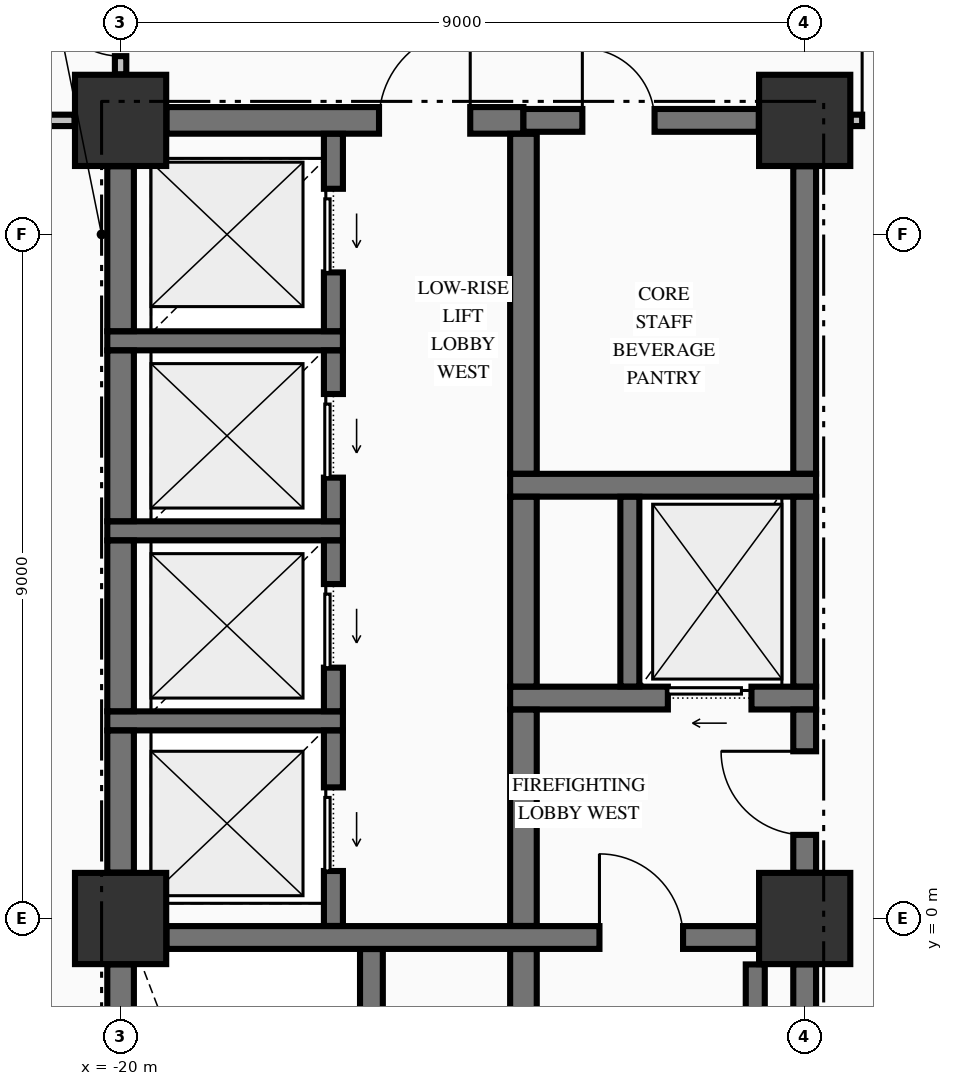
"""IFC4 building model, lengths in metres.
Left out: names, types, materials, properties, quantities, classifications, styles, units other than length and angle.
Written with IfcOpenShell. Run it as: python <this file> out.ifc"""

import sys

from ifc_helpers import new_model, si_unit, direction, frame, frame_2d, origin, origin_2d, place, context, subcontext, project, spatial, rectangle, extrude, element, fill, save


model = new_model("IFC4")
c1 = context("Model", 3, precision=1e-05, world=origin(), true_north=direction((0.0, 1.0)))
c2 = subcontext(c1, "Body", "Model", "MODEL_VIEW")
j1 = project(units=[si_unit("LENGTHUNIT", "METRE"), si_unit("PLANEANGLEUNIT", "RADIAN")], contexts=[c1])
p1 = place(None, origin())
s1 = spatial("IfcSite", under=j1, at=p1, CompositionType="ELEMENT")
p2 = place(p1, origin())
s2 = spatial("IfcBuilding", under=s1, at=p2, CompositionType="ELEMENT")
p3 = place(p2, frame((0.0, 0.0, 45.05)))
s3 = spatial("IfcBuildingStorey", under=s2, at=p3, CompositionType="ELEMENT", Elevation=45.05)
for number, where, z_axis, x_axis in (
    (1, (-20.0, 10.5, -0.25), (0.0, 0.0, 1.0), (1.0, 0.0, 0.0)),
    (2, (-11.0, 0.0, -0.25), (0.0, 0.0, 1.0), (1.0, 0.0, 0.0)),
    (3, (-11.0, 10.5, -0.25), (0.0, 0.0, 1.0), (1.0, 0.0, 0.0)),
    (4, (-20.0, 0.0, -0.25), (0.0, 0.0, 1.0), (1.0, 0.0, 0.0)),
):
    element("IfcColumn", number, at=place(p3, frame(where, z_axis=z_axis, x_axis=x_axis)), inside=s3, PredefinedType="COLUMN", context=c2, shape_type="SweptSolid", body=[
        extrude(rectangle(XDim=1.2, YDim=1.2, at=origin_2d()), origin(), (0.0, 0.0, 1.0), 3.57),
    ])
p4 = place(p3, frame((-19.396, -0.25, 0.0), z_axis=(0.0, 0.0, 1.0), x_axis=(1.0, 0.0, 0.0)))
e5 = element("IfcWall", 5, at=p4, inside=s3, PredefinedType="SHEAR", context=c2, shape_type="SweptSolid", body=[
    extrude(rectangle(XDim=7.792, YDim=0.3, at=frame_2d((3.896, 0.0))), origin(), (0.0, 0.0, 1.0), 3.32),
])
p5 = place(p4, frame((5.696, 0.0, 0.0)))
e6 = element("IfcOpeningElement", 6, at=p5, cuts=e5, PredefinedType="OPENING", context=c2, shape_type="SweptSolid", body=[
    extrude(rectangle(XDim=1.1, YDim=2.15, at=frame_2d((0.55, 1.075))), frame((0.0, 0.16, 0.0), z_axis=(0.0, -1.0, 0.0), x_axis=(1.0, 0.0, 0.0)), (0.0, 0.0, 1.0), 0.32),
])
p6 = place(p3, frame((-20.175, 2.6, 0.0), z_axis=(0.0, 0.0, 1.0), x_axis=(1.0, 0.0, 0.0)))
e7 = element("IfcWall", 7, at=p6, inside=s3, PredefinedType="SOLIDWALL", context=c2, shape_type="SweptSolid", body=[
    extrude(rectangle(XDim=3.1, YDim=0.25, at=frame_2d((1.55, 0.0))), origin(), (0.0, 0.0, 1.0), 3.32),
])
p7 = place(p3, frame((-14.875, 2.9, 0.0), z_axis=(0.0, 0.0, 1.0), x_axis=(1.0, 0.0, 0.0)))
e8 = element("IfcWall", 8, at=p7, inside=s3, PredefinedType="SHEAR", context=c2, shape_type="SweptSolid", body=[
    extrude(rectangle(XDim=4.025, YDim=0.3, at=frame_2d((2.012, 0.0))), origin(), (0.0, 0.0, 1.0), 3.32),
])
p8 = place(p7, frame((2.075, 0.0, 0.0)))
e9 = element("IfcOpeningElement", 9, at=p8, cuts=e8, PredefinedType="OPENING", context=c2, shape_type="SweptSolid", body=[
    extrude(rectangle(XDim=1.1, YDim=2.2, at=frame_2d((0.55, 1.1))), frame((0.0, 0.16, 0.0), z_axis=(0.0, -1.0, 0.0), x_axis=(1.0, 0.0, 0.0)), (0.0, 0.0, 1.0), 0.32),
])
p9 = place(p3, frame((-20.175, 5.1, 0.0), z_axis=(0.0, 0.0, 1.0), x_axis=(1.0, 0.0, 0.0)))
e10 = element("IfcWall", 10, at=p9, inside=s3, PredefinedType="SOLIDWALL", context=c2, shape_type="SweptSolid", body=[
    extrude(rectangle(XDim=3.1, YDim=0.25, at=frame_2d((1.55, 0.0))), origin(), (0.0, 0.0, 1.0), 3.32),
])
p10 = place(p3, frame((-14.875, 5.7, 0.0), z_axis=(0.0, 0.0, 1.0), x_axis=(1.0, 0.0, 0.0)))
e11 = element("IfcWall", 11, at=p10, inside=s3, PredefinedType="SHEAR", context=c2, shape_type="SweptSolid", body=[
    extrude(rectangle(XDim=4.025, YDim=0.3, at=frame_2d((2.012, 0.0))), origin(), (0.0, 0.0, 1.0), 3.32),
])
p11 = place(p3, frame((-20.175, 7.6, 0.0), z_axis=(0.0, 0.0, 1.0), x_axis=(1.0, 0.0, 0.0)))
e12 = element("IfcWall", 12, at=p11, inside=s3, PredefinedType="SOLIDWALL", context=c2, shape_type="SweptSolid", body=[
    extrude(rectangle(XDim=3.1, YDim=0.25, at=frame_2d((1.55, 0.0))), origin(), (0.0, 0.0, 1.0), 3.32),
])
p12 = place(p3, frame((-19.396, 10.5, 0.0), z_axis=(0.0, 0.0, 1.0), x_axis=(1.0, 0.0, 0.0)))
e13 = element("IfcWall", 13, at=p12, inside=s3, PredefinedType="SHEAR", context=c2, shape_type="SweptSolid", body=[
    extrude(rectangle(XDim=4.696, YDim=0.35, at=frame_2d((2.348, 0.0))), origin(), (0.0, 0.0, 1.0), 3.32),
])
p13 = place(p12, frame((2.796, 0.0, 0.0)))
e14 = element("IfcOpeningElement", 14, at=p13, cuts=e13, PredefinedType="OPENING", context=c2, shape_type="SweptSolid", body=[
    extrude(rectangle(XDim=1.2, YDim=2.15, at=frame_2d((0.6, 1.075))), frame((0.0, 0.185, 0.0), z_axis=(0.0, -1.0, 0.0), x_axis=(1.0, 0.0, 0.0)), (0.0, 0.0, 1.0), 0.37),
])
p14 = place(p3, frame((-14.7, 10.5, 0.0), z_axis=(0.0, 0.0, 1.0), x_axis=(1.0, 0.0, 0.0)))
e15 = element("IfcWall", 15, at=p14, inside=s3, PredefinedType="SHEAR", context=c2, shape_type="SweptSolid", body=[
    extrude(rectangle(XDim=3.096, YDim=0.3, at=frame_2d((1.548, 0.0))), origin(), (0.0, 0.0, 1.0), 3.32),
])
p15 = place(p14, frame((0.775, 0.0, 0.0)))
e16 = element("IfcOpeningElement", 16, at=p15, cuts=e15, PredefinedType="OPENING", context=c2, shape_type="SweptSolid", body=[
    extrude(rectangle(XDim=0.95, YDim=2.15, at=frame_2d((0.475, 1.075))), frame((0.0, 0.16, 0.0), z_axis=(0.0, -1.0, 0.0), x_axis=(1.0, 0.0, 0.0)), (0.0, 0.0, 1.0), 0.32),
])
p16 = place(p3, frame((-23.835, 10.5, 0.0), z_axis=(0.0, 0.0, 1.0), x_axis=(1.0, 0.0, 0.0)))
e17 = element("IfcWall", 17, at=p16, inside=s3, PredefinedType="PARTITIONING", context=c2, shape_type="SweptSolid", body=[
    extrude(rectangle(XDim=3.229, YDim=0.15, at=frame_2d((1.615, 0.0))), origin(), (0.0, 0.0, 1.0), 3.32),
])
p17 = place(p16, frame((1.335, 0.0, 0.0)))
e18 = element("IfcOpeningElement", 18, at=p17, cuts=e17, PredefinedType="OPENING", context=c2, shape_type="SweptSolid", body=[
    extrude(rectangle(XDim=1.0, YDim=2.15, at=frame_2d((0.5, 1.075))), frame((0.0, 0.085, 0.0), z_axis=(0.0, -1.0, 0.0), x_axis=(1.0, 0.0, 0.0)), (0.0, 0.0, 1.0), 0.17),
])
p18 = place(p3, frame((-10.394, 10.5, 0.0), z_axis=(0.0, 0.0, 1.0), x_axis=(1.0, 0.0, 0.0)))
e19 = element("IfcWall", 19, at=p18, inside=s3, PredefinedType="PARTITIONING", context=c2, shape_type="SweptSolid", body=[
    extrude(rectangle(XDim=20.788, YDim=0.15, at=frame_2d((10.394, 0.0))), origin(), (0.0, 0.0, 1.0), 3.32),
])
p19 = place(p18, frame((0.15, 0.0, 0.0)))
e20 = element("IfcOpeningElement", 20, at=p19, cuts=e19, PredefinedType="OPENING", context=c2, shape_type="SweptSolid", body=[
    extrude(rectangle(XDim=1.05, YDim=2.15, at=frame_2d((0.525, 1.075))), frame((0.0, 0.085, 0.0), z_axis=(0.0, -1.0, 0.0), x_axis=(1.0, 0.0, 0.0)), (0.0, 0.0, 1.0), 0.17),
])
p20 = place(p18, frame((19.588, 0.0, 0.0)))
e21 = element("IfcOpeningElement", 21, at=p20, cuts=e19, PredefinedType="OPENING", context=c2, shape_type="SweptSolid", body=[
    extrude(rectangle(XDim=1.05, YDim=2.15, at=frame_2d((0.525, 1.075))), frame((0.0, 0.085, 0.0), z_axis=(0.0, -1.0, 0.0), x_axis=(1.0, 0.0, 0.0)), (0.0, 0.0, 1.0), 0.17),
])
p21 = place(p3, frame((-20.0, -9.346, 0.0), z_axis=(0.0, 0.0, 1.0), x_axis=(0.0, 1.0, 0.0)))
e22 = element("IfcWall", 22, at=p21, inside=s3, PredefinedType="SHEAR", context=c2, shape_type="SweptSolid", body=[
    extrude(rectangle(XDim=8.742, YDim=0.35, at=frame_2d((4.371, 0.0))), origin(), (0.0, 0.0, 1.0), 3.32),
])
p22 = place(p3, frame((-20.0, 0.604, 0.0), z_axis=(0.0, 0.0, 1.0), x_axis=(0.0, 1.0, 0.0)))
e23 = element("IfcWall", 23, at=p22, inside=s3, PredefinedType="SHEAR", context=c2, shape_type="SweptSolid", body=[
    extrude(rectangle(XDim=1.869, YDim=0.35, at=frame_2d((0.935, 0.0))), origin(), (0.0, 0.0, 1.0), 3.32),
])
for number, where, z_axis, x_axis in (
    (24, (-20.0, 2.727, 0.0), (0.0, 0.0, 1.0), (0.0, 1.0, 0.0)),
    (25, (-20.0, 5.227, 0.0), (0.0, 0.0, 1.0), (0.0, 1.0, 0.0)),
):
    element("IfcWall", number, at=place(p3, frame(where, z_axis=z_axis, x_axis=x_axis)), inside=s3, PredefinedType="SHEAR", context=c2, shape_type="SweptSolid", body=[
        extrude(rectangle(XDim=2.246, YDim=0.35, at=frame_2d((1.123, 0.0))), origin(), (0.0, 0.0, 1.0), 3.32),
    ])
p23 = place(p3, frame((-20.0, 7.727, 0.0), z_axis=(0.0, 0.0, 1.0), x_axis=(0.0, 1.0, 0.0)))
e26 = element("IfcWall", 26, at=p23, inside=s3, PredefinedType="SHEAR", context=c2, shape_type="SweptSolid", body=[
    extrude(rectangle(XDim=2.169, YDim=0.35, at=frame_2d((1.084, 0.0))), origin(), (0.0, 0.0, 1.0), 3.32),
])
p24 = place(p3, frame((-17.2, -0.098, 0.0), z_axis=(0.0, 0.0, 1.0), x_axis=(0.0, 1.0, 0.0)))
e27 = element("IfcWall", 27, at=p24, inside=s3, PredefinedType="SOLIDWALL", context=c2, shape_type="SweptSolid", body=[
    extrude(rectangle(XDim=2.571, YDim=0.25, at=frame_2d((1.285, 0.0))), origin(), (0.0, 0.0, 1.0), 3.32),
])
p25 = place(p24, frame((0.723, 0.0, 0.0)))
e28 = element("IfcOpeningElement", 28, at=p25, cuts=e27, PredefinedType="OPENING", context=c2, shape_type="SweptSolid", body=[
    extrude(rectangle(XDim=1.1, YDim=2.2, at=frame_2d((0.55, 1.1))), frame((0.0, 0.135, 0.0), z_axis=(0.0, -1.0, 0.0), x_axis=(1.0, 0.0, 0.0)), (0.0, 0.0, 1.0), 0.27),
])
p26 = place(p3, frame((-17.2, 2.727, 0.0), z_axis=(0.0, 0.0, 1.0), x_axis=(0.0, 1.0, 0.0)))
e29 = element("IfcWall", 29, at=p26, inside=s3, PredefinedType="SOLIDWALL", context=c2, shape_type="SweptSolid", body=[
    extrude(rectangle(XDim=2.246, YDim=0.25, at=frame_2d((1.123, 0.0))), origin(), (0.0, 0.0, 1.0), 3.32),
])
p27 = place(p26, frame((0.573, 0.0, 0.0)))
e30 = element("IfcOpeningElement", 30, at=p27, cuts=e29, PredefinedType="OPENING", context=c2, shape_type="SweptSolid", body=[
    extrude(rectangle(XDim=1.1, YDim=2.2, at=frame_2d((0.55, 1.1))), frame((0.0, 0.135, 0.0), z_axis=(0.0, -1.0, 0.0), x_axis=(1.0, 0.0, 0.0)), (0.0, 0.0, 1.0), 0.27),
])
p28 = place(p3, frame((-17.2, 5.227, 0.0), z_axis=(0.0, 0.0, 1.0), x_axis=(0.0, 1.0, 0.0)))
e31 = element("IfcWall", 31, at=p28, inside=s3, PredefinedType="SOLIDWALL", context=c2, shape_type="SweptSolid", body=[
    extrude(rectangle(XDim=2.246, YDim=0.25, at=frame_2d((1.123, 0.0))), origin(), (0.0, 0.0, 1.0), 3.32),
])
p29 = place(p28, frame((0.573, 0.0, 0.0)))
e32 = element("IfcOpeningElement", 32, at=p29, cuts=e31, PredefinedType="OPENING", context=c2, shape_type="SweptSolid", body=[
    extrude(rectangle(XDim=1.1, YDim=2.2, at=frame_2d((0.55, 1.1))), frame((0.0, 0.135, 0.0), z_axis=(0.0, -1.0, 0.0), x_axis=(1.0, 0.0, 0.0)), (0.0, 0.0, 1.0), 0.27),
])
p30 = place(p3, frame((-17.2, 7.727, 0.0), z_axis=(0.0, 0.0, 1.0), x_axis=(0.0, 1.0, 0.0)))
e33 = element("IfcWall", 33, at=p30, inside=s3, PredefinedType="SOLIDWALL", context=c2, shape_type="SweptSolid", body=[
    extrude(rectangle(XDim=2.596, YDim=0.25, at=frame_2d((1.298, 0.0))), origin(), (0.0, 0.0, 1.0), 3.32),
])
p31 = place(p30, frame((0.773, 0.0, 0.0)))
e34 = element("IfcOpeningElement", 34, at=p31, cuts=e33, PredefinedType="OPENING", context=c2, shape_type="SweptSolid", body=[
    extrude(rectangle(XDim=1.1, YDim=2.2, at=frame_2d((0.55, 1.1))), frame((0.0, 0.135, 0.0), z_axis=(0.0, -1.0, 0.0), x_axis=(1.0, 0.0, 0.0)), (0.0, 0.0, 1.0), 0.27),
])
p32 = place(p3, frame((-16.7, -9.773, 0.0), z_axis=(0.0, 0.0, 1.0), x_axis=(0.0, 1.0, 0.0)))
e35 = element("IfcWall", 35, at=p32, inside=s3, PredefinedType="SHEAR", context=c2, shape_type="SweptSolid", body=[
    extrude(rectangle(XDim=9.371, YDim=0.3, at=frame_2d((4.686, 0.0))), origin(), (0.0, 0.0, 1.0), 3.32),
])
p33 = place(p3, frame((-14.7, -9.773, 0.0), z_axis=(0.0, 0.0, 1.0), x_axis=(0.0, 1.0, 0.0)))
e36 = element("IfcWall", 36, at=p33, inside=s3, PredefinedType="SHEAR", context=c2, shape_type="SweptSolid", body=[
    extrude(rectangle(XDim=9.371, YDim=0.35, at=frame_2d((4.686, 0.0))), origin(), (0.0, 0.0, 1.0), 3.32),
])
p34 = place(p3, frame((-14.7, -0.098, 0.0), z_axis=(0.0, 0.0, 1.0), x_axis=(0.0, 1.0, 0.0)))
e37 = element("IfcWall", 37, at=p34, inside=s3, PredefinedType="SHEAR", context=c2, shape_type="SweptSolid", body=[
    extrude(rectangle(XDim=2.846, YDim=0.35, at=frame_2d((1.423, 0.0))), origin(), (0.0, 0.0, 1.0), 3.32),
])
p35 = place(p3, frame((-14.7, 3.052, 0.0), z_axis=(0.0, 0.0, 1.0), x_axis=(0.0, 1.0, 0.0)))
e38 = element("IfcWall", 38, at=p35, inside=s3, PredefinedType="SHEAR", context=c2, shape_type="SweptSolid", body=[
    extrude(rectangle(XDim=2.496, YDim=0.35, at=frame_2d((1.248, 0.0))), origin(), (0.0, 0.0, 1.0), 3.32),
])
p36 = place(p3, frame((-14.7, 5.852, 0.0), z_axis=(0.0, 0.0, 1.0), x_axis=(0.0, 1.0, 0.0)))
e39 = element("IfcWall", 39, at=p36, inside=s3, PredefinedType="SHEAR", context=c2, shape_type="SweptSolid", body=[
    extrude(rectangle(XDim=4.471, YDim=0.35, at=frame_2d((2.235, 0.0))), origin(), (0.0, 0.0, 1.0), 3.32),
])
p37 = place(p3, frame((-13.3, 3.052, 0.0), z_axis=(0.0, 0.0, 1.0), x_axis=(0.0, 1.0, 0.0)))
e40 = element("IfcWall", 40, at=p37, inside=s3, PredefinedType="SOLIDWALL", context=c2, shape_type="SweptSolid", body=[
    extrude(rectangle(XDim=2.496, YDim=0.25, at=frame_2d((1.248, 0.0))), origin(), (0.0, 0.0, 1.0), 3.32),
])
p38 = place(p3, frame((-11.65, -9.346, 0.0), z_axis=(0.0, 0.0, 1.0), x_axis=(0.0, 1.0, 0.0)))
e41 = element("IfcWall", 41, at=p38, inside=s3, PredefinedType="SOLIDWALL", context=c2, shape_type="SweptSolid", body=[
    extrude(rectangle(XDim=8.742, YDim=0.25, at=frame_2d((4.371, 0.0))), origin(), (0.0, 0.0, 1.0), 3.32),
])
p39 = place(p3, frame((-11.0, -9.346, 0.0), z_axis=(0.0, 0.0, 1.0), x_axis=(0.0, 1.0, 0.0)))
e42 = element("IfcWall", 42, at=p39, inside=s3, PredefinedType="SHEAR", context=c2, shape_type="SweptSolid", body=[
    extrude(rectangle(XDim=8.742, YDim=0.3, at=frame_2d((4.371, 0.0))), origin(), (0.0, 0.0, 1.0), 3.32),
])
p40 = place(p3, frame((-11.0, 0.604, 0.0), z_axis=(0.0, 0.0, 1.0), x_axis=(0.0, 1.0, 0.0)))
e43 = element("IfcWall", 43, at=p40, inside=s3, PredefinedType="SHEAR", context=c2, shape_type="SweptSolid", body=[
    extrude(rectangle(XDim=2.144, YDim=0.3, at=frame_2d((1.072, 0.0))), origin(), (0.0, 0.0, 1.0), 3.32),
])
p41 = place(p40, frame((0.496, 0.0, 0.0)))
e44 = element("IfcOpeningElement", 44, at=p41, cuts=e43, PredefinedType="OPENING", context=c2, shape_type="SweptSolid", body=[
    extrude(rectangle(XDim=1.1, YDim=2.15, at=frame_2d((0.55, 1.075))), frame((0.0, 0.16, 0.0), z_axis=(0.0, -1.0, 0.0), x_axis=(1.0, 0.0, 0.0)), (0.0, 0.0, 1.0), 0.32),
])
p42 = place(p3, frame((-11.0, 3.052, 0.0), z_axis=(0.0, 0.0, 1.0), x_axis=(0.0, 1.0, 0.0)))
e45 = element("IfcWall", 45, at=p42, inside=s3, PredefinedType="SHEAR", context=c2, shape_type="SweptSolid", body=[
    extrude(rectangle(XDim=2.496, YDim=0.3, at=frame_2d((1.248, 0.0))), origin(), (0.0, 0.0, 1.0), 3.32),
])
p43 = place(p3, frame((-11.0, 5.852, 0.0), z_axis=(0.0, 0.0, 1.0), x_axis=(0.0, 1.0, 0.0)))
e46 = element("IfcWall", 46, at=p43, inside=s3, PredefinedType="SHEAR", context=c2, shape_type="SweptSolid", body=[
    extrude(rectangle(XDim=4.044, YDim=0.3, at=frame_2d((2.022, 0.0))), origin(), (0.0, 0.0, 1.0), 3.32),
])
p44 = place(p3, frame((-20.0, 11.106, 0.0), z_axis=(0.0, 0.0, 1.0), x_axis=(0.0, 1.0, 0.0)))
e47 = element("IfcWall", 47, at=p44, inside=s3, PredefinedType="PARTITIONING", context=c2, shape_type="SweptSolid", body=[
    extrude(rectangle(XDim=1.966, YDim=0.15, at=frame_2d((0.983, 0.0))), origin(), (0.0, 0.0, 1.0), 3.32),
])
p45 = place(p44, frame((0.239, 0.0, 0.0)))
e48 = element("IfcOpeningElement", 48, at=p45, cuts=e47, PredefinedType="OPENING", context=c2, shape_type="SweptSolid", body=[
    extrude(rectangle(XDim=0.95, YDim=2.15, at=frame_2d((0.475, 1.075))), frame((0.0, 0.085, 0.0), z_axis=(0.0, -1.0, 0.0), x_axis=(1.0, 0.0, 0.0)), (0.0, 0.0, 1.0), 0.17),
])
p46 = place(p5, origin())
e49 = element("IfcDoor", 49, at=p46, inside=s3, OperationType="SINGLE_SWING_LEFT", PredefinedType="DOOR", context=c2, shape_type="SweptSolid", body=[
    extrude(rectangle(XDim=1.1, YDim=2.15, at=frame_2d((0.55, 1.075))), frame((0.0, 0.025, 0.0), z_axis=(0.0, -1.0, 0.0), x_axis=(1.0, 0.0, 0.0)), (0.0, 0.0, 1.0), 0.05),
])
fill(e6, e49)
p47 = place(p41, origin())
e50 = element("IfcDoor", 50, at=p47, inside=s3, OperationType="SINGLE_SWING_RIGHT", PredefinedType="DOOR", context=c2, shape_type="SweptSolid", body=[
    extrude(rectangle(XDim=1.1, YDim=2.15, at=frame_2d((0.55, 1.075))), frame((0.0, 0.025, 0.0), z_axis=(0.0, -1.0, 0.0), x_axis=(1.0, 0.0, 0.0)), (0.0, 0.0, 1.0), 0.05),
])
fill(e44, e50)
p48 = place(p8, origin())
e51 = element("IfcDoor", 51, at=p48, inside=s3, OperationType="SLIDING_TO_LEFT", PredefinedType="DOOR", context=c2, shape_type="SweptSolid", body=[
    extrude(rectangle(XDim=1.1, YDim=2.2, at=frame_2d((0.55, 1.1))), frame((0.0, 0.025, 0.0), z_axis=(0.0, -1.0, 0.0), x_axis=(1.0, 0.0, 0.0)), (0.0, 0.0, 1.0), 0.05),
])
fill(e9, e51)
p49 = place(p15, origin())
e52 = element("IfcDoor", 52, at=p49, inside=s3, OperationType="SINGLE_SWING_LEFT", PredefinedType="DOOR", context=c2, shape_type="SweptSolid", body=[
    extrude(rectangle(XDim=0.95, YDim=2.15, at=frame_2d((0.475, 1.075))), frame((0.0, 0.025, 0.0), z_axis=(0.0, -1.0, 0.0), x_axis=(1.0, 0.0, 0.0)), (0.0, 0.0, 1.0), 0.05),
])
fill(e16, e52)
p50 = place(p13, origin())
e53 = element("IfcDoor", 53, at=p50, inside=s3, OperationType="SINGLE_SWING_RIGHT", PredefinedType="DOOR", context=c2, shape_type="SweptSolid", body=[
    extrude(rectangle(XDim=1.2, YDim=2.15, at=frame_2d((0.6, 1.075))), frame((0.0, 0.025, 0.0), z_axis=(0.0, -1.0, 0.0), x_axis=(1.0, 0.0, 0.0)), (0.0, 0.0, 1.0), 0.05),
])
fill(e14, e53)
p51 = place(p25, origin())
e54 = element("IfcDoor", 54, at=p51, inside=s3, OperationType="SLIDING_TO_LEFT", PredefinedType="DOOR", context=c2, shape_type="SweptSolid", body=[
    extrude(rectangle(XDim=1.1, YDim=2.2, at=frame_2d((0.55, 1.1))), frame((0.0, 0.025, 0.0), z_axis=(0.0, -1.0, 0.0), x_axis=(1.0, 0.0, 0.0)), (0.0, 0.0, 1.0), 0.05),
])
fill(e28, e54)
p52 = place(p27, origin())
e55 = element("IfcDoor", 55, at=p52, inside=s3, OperationType="SLIDING_TO_LEFT", PredefinedType="DOOR", context=c2, shape_type="SweptSolid", body=[
    extrude(rectangle(XDim=1.1, YDim=2.2, at=frame_2d((0.55, 1.1))), frame((0.0, 0.025, 0.0), z_axis=(0.0, -1.0, 0.0), x_axis=(1.0, 0.0, 0.0)), (0.0, 0.0, 1.0), 0.05),
])
fill(e30, e55)
p53 = place(p29, origin())
e56 = element("IfcDoor", 56, at=p53, inside=s3, OperationType="SLIDING_TO_LEFT", PredefinedType="DOOR", context=c2, shape_type="SweptSolid", body=[
    extrude(rectangle(XDim=1.1, YDim=2.2, at=frame_2d((0.55, 1.1))), frame((0.0, 0.025, 0.0), z_axis=(0.0, -1.0, 0.0), x_axis=(1.0, 0.0, 0.0)), (0.0, 0.0, 1.0), 0.05),
])
fill(e32, e56)
p54 = place(p31, origin())
e57 = element("IfcDoor", 57, at=p54, inside=s3, OperationType="SLIDING_TO_LEFT", PredefinedType="DOOR", context=c2, shape_type="SweptSolid", body=[
    extrude(rectangle(XDim=1.1, YDim=2.2, at=frame_2d((0.55, 1.1))), frame((0.0, 0.025, 0.0), z_axis=(0.0, -1.0, 0.0), x_axis=(1.0, 0.0, 0.0)), (0.0, 0.0, 1.0), 0.05),
])
fill(e34, e57)
p55 = place(p19, origin())
e58 = element("IfcDoor", 58, at=p55, inside=s3, OperationType="SINGLE_SWING_LEFT", PredefinedType="DOOR", context=c2, shape_type="SweptSolid", body=[
    extrude(rectangle(XDim=1.05, YDim=2.15, at=frame_2d((0.525, 1.075))), frame((0.0, 0.025, 0.0), z_axis=(0.0, -1.0, 0.0), x_axis=(1.0, 0.0, 0.0)), (0.0, 0.0, 1.0), 0.05),
])
fill(e20, e58)
p56 = place(p45, origin())
e59 = element("IfcDoor", 59, at=p56, inside=s3, OperationType="SINGLE_SWING_RIGHT", PredefinedType="DOOR", context=c2, shape_type="SweptSolid", body=[
    extrude(rectangle(XDim=0.95, YDim=2.15, at=frame_2d((0.475, 1.075))), frame((0.0, 0.025, 0.0), z_axis=(0.0, -1.0, 0.0), x_axis=(1.0, 0.0, 0.0)), (0.0, 0.0, 1.0), 0.05),
])
fill(e48, e59)
save(model, sys.argv[1])
